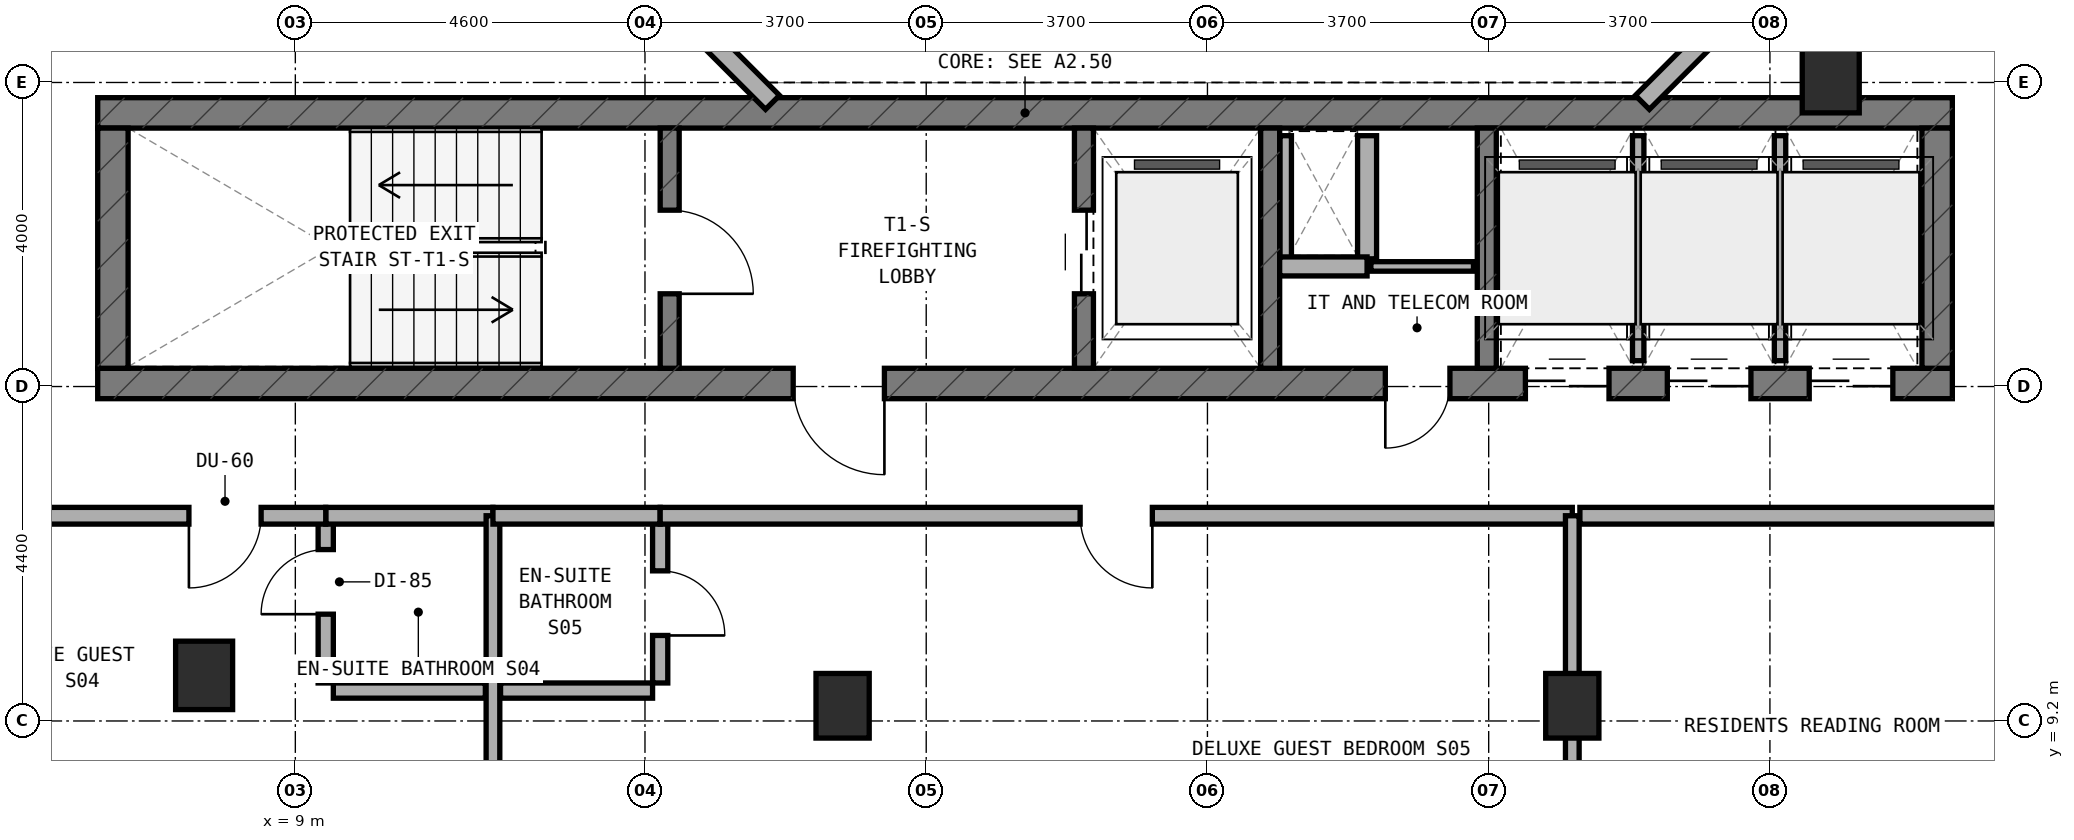
"""IFC4 building model, lengths in metres.
Left out: names, types, materials, properties, quantities, classifications, styles, units other than length and angle.
Written with IfcOpenShell. Run it as: python <this file> out.ifc"""

import sys

from ifc_helpers import new_model, si_unit, direction, frame, frame_2d, origin, origin_2d, place, context, subcontext, project, spatial, rectangle, extrude, element, fill, save


model = new_model("IFC4")
c1 = context("Model", 3, precision=1e-05, world=origin(), true_north=direction((0.0, 1.0)))
c2 = subcontext(c1, "Body", "Model", "MODEL_VIEW")
j1 = project(units=[si_unit("LENGTHUNIT", "METRE"), si_unit("PLANEANGLEUNIT", "RADIAN")], contexts=[c1])
p1 = place(None, origin())
s1 = spatial("IfcSite", under=j1, at=p1, CompositionType="ELEMENT")
p2 = place(p1, origin())
s2 = spatial("IfcBuilding", under=s1, at=p2, CompositionType="ELEMENT")
p3 = place(p2, frame((0.0, 0.0, 235.1)))
s3 = spatial("IfcBuildingStorey", under=s2, at=p3, CompositionType="ELEMENT", Elevation=235.1)
p4 = place(p3, frame((6.4, 13.64, 0.0), z_axis=(0.0, 0.0, 1.0), x_axis=(1.0, 0.0, 0.0)))
e1 = element("IfcWall", 1, at=p4, inside=s3, PredefinedType="SHEAR", context=c2, shape_type="SweptSolid", body=[
    extrude(rectangle(XDim=24.4, YDim=0.4, at=frame_2d((12.2, 0.0))), origin(), (0.0, 0.0, 1.0), 3.6),
])
p5 = place(p4, frame((9.15, 0.0, 0.0)))
e2 = element("IfcOpeningElement", 2, at=p5, cuts=e1, PredefinedType="OPENING", context=c2, shape_type="SweptSolid", body=[
    extrude(rectangle(XDim=1.2, YDim=2.15, at=frame_2d((0.6, 1.075))), frame((0.0, 0.21, 0.0), z_axis=(0.0, -1.0, 0.0), x_axis=(1.0, 0.0, 0.0)), (0.0, 0.0, 1.0), 0.42),
])
p6 = place(p4, frame((16.94, 0.0, 0.0)))
e3 = element("IfcOpeningElement", 3, at=p6, cuts=e1, PredefinedType="OPENING", context=c2, shape_type="SweptSolid", body=[
    extrude(rectangle(XDim=0.85, YDim=2.1, at=frame_2d((0.425, 1.05))), frame((0.0, 0.21, 0.0), z_axis=(0.0, -1.0, 0.0), x_axis=(1.0, 0.0, 0.0)), (0.0, 0.0, 1.0), 0.42),
])
p7 = place(p4, frame((18.783, 0.0, 0.0)))
e4 = element("IfcOpeningElement", 4, at=p7, cuts=e1, PredefinedType="OPENING", context=c2, shape_type="SweptSolid", body=[
    extrude(rectangle(XDim=1.1, YDim=2.15, at=frame_2d((0.55, 1.075))), frame((0.0, 0.21, 0.0), z_axis=(0.0, -1.0, 0.0), x_axis=(1.0, 0.0, 0.0)), (0.0, 0.0, 1.0), 0.42),
])
p8 = place(p4, frame((20.65, 0.0, 0.0)))
e5 = element("IfcOpeningElement", 5, at=p8, cuts=e1, PredefinedType="OPENING", context=c2, shape_type="SweptSolid", body=[
    extrude(rectangle(XDim=1.1, YDim=2.15, at=frame_2d((0.55, 1.075))), frame((0.0, 0.21, 0.0), z_axis=(0.0, -1.0, 0.0), x_axis=(1.0, 0.0, 0.0)), (0.0, 0.0, 1.0), 0.42),
])
p9 = place(p4, frame((22.517, 0.0, 0.0)))
e6 = element("IfcOpeningElement", 6, at=p9, cuts=e1, PredefinedType="OPENING", context=c2, shape_type="SweptSolid", body=[
    extrude(rectangle(XDim=1.1, YDim=2.15, at=frame_2d((0.55, 1.075))), frame((0.0, 0.21, 0.0), z_axis=(0.0, -1.0, 0.0), x_axis=(1.0, 0.0, 0.0)), (0.0, 0.0, 1.0), 0.42),
])
p10 = place(p3, frame((6.4, 17.2, 0.0), z_axis=(0.0, 0.0, 1.0), x_axis=(1.0, 0.0, 0.0)))
e7 = element("IfcWall", 7, at=p10, inside=s3, PredefinedType="SHEAR", context=c2, shape_type="SweptSolid", body=[
    extrude(rectangle(XDim=24.4, YDim=0.4, at=frame_2d((12.2, 0.0))), origin(), (0.0, 0.0, 1.0), 3.6),
])
for number, where, z_axis, x_axis in (
    (8, (6.6, 13.84, 0.0), (0.0, 0.0, 1.0), (0.0, 1.0, 0.0)),
    (9, (30.6, 13.84, 0.0), (0.0, 0.0, 1.0), (0.0, 1.0, 0.0)),
):
    element("IfcWall", number, at=place(p3, frame(where, z_axis=z_axis, x_axis=x_axis)), inside=s3, PredefinedType="SHEAR", context=c2, shape_type="SweptSolid", body=[
        extrude(rectangle(XDim=3.16, YDim=0.4, at=frame_2d((1.58, 0.0))), origin(), (0.0, 0.0, 1.0), 3.6),
    ])
p11 = place(p3, frame((13.925, 13.84, 0.0), z_axis=(0.0, 0.0, 1.0), x_axis=(0.0, 1.0, 0.0)))
e10 = element("IfcWall", 10, at=p11, inside=s3, PredefinedType="STANDARD", context=c2, shape_type="SweptSolid", body=[
    extrude(rectangle(XDim=3.16, YDim=0.25, at=frame_2d((1.58, 0.0))), origin(), (0.0, 0.0, 1.0), 3.28),
])
p12 = place(p11, frame((0.98, 0.0, 0.0)))
e11 = element("IfcOpeningElement", 11, at=p12, cuts=e10, PredefinedType="OPENING", context=c2, shape_type="SweptSolid", body=[
    extrude(rectangle(XDim=1.1, YDim=2.15, at=frame_2d((0.55, 1.075))), frame((0.0, 0.135, 0.0), z_axis=(0.0, -1.0, 0.0), x_axis=(1.0, 0.0, 0.0)), (0.0, 0.0, 1.0), 0.27),
])
p13 = place(p3, frame((19.375, 13.84, 0.0), z_axis=(0.0, 0.0, 1.0), x_axis=(0.0, 1.0, 0.0)))
e12 = element("IfcWall", 12, at=p13, inside=s3, PredefinedType="STANDARD", context=c2, shape_type="SweptSolid", body=[
    extrude(rectangle(XDim=3.16, YDim=0.25, at=frame_2d((1.58, 0.0))), origin(), (0.0, 0.0, 1.0), 3.28),
])
p14 = place(p13, frame((0.98, 0.0, 0.0)))
e13 = element("IfcOpeningElement", 13, at=p14, cuts=e12, PredefinedType="OPENING", context=c2, shape_type="SweptSolid", body=[
    extrude(rectangle(XDim=1.1, YDim=2.15, at=frame_2d((0.55, 1.075))), frame((0.0, 0.135, 0.0), z_axis=(0.0, -1.0, 0.0), x_axis=(1.0, 0.0, 0.0)), (0.0, 0.0, 1.0), 0.27),
])
for number, where, z_axis, x_axis in (
    (14, (21.825, 13.84, 0.0), (0.0, 0.0, 1.0), (0.0, 1.0, 0.0)),
    (15, (24.675, 13.84, 0.0), (0.0, 0.0, 1.0), (0.0, 1.0, 0.0)),
):
    element("IfcWall", number, at=place(p3, frame(where, z_axis=z_axis, x_axis=x_axis)), inside=s3, PredefinedType="STANDARD", context=c2, shape_type="SweptSolid", body=[
        extrude(rectangle(XDim=3.16, YDim=0.25, at=frame_2d((1.58, 0.0))), origin(), (0.0, 0.0, 1.0), 3.28),
    ])
for number, where, z_axis, x_axis in (
    (16, (16.2, 9.4, 0.0), (0.0, 0.0, 1.0), (1.0, 0.0, 0.0)),
    (17, (25.8, 9.4, 0.0), (0.0, 0.0, 1.0), (1.0, 0.0, 0.0)),
):
    element("IfcColumn", number, at=place(p3, frame(where, z_axis=z_axis, x_axis=x_axis)), inside=s3, PredefinedType="COLUMN", context=c2, shape_type="SweptSolid", body=[
        extrude(rectangle(XDim=0.7, YDim=0.85, at=origin_2d()), origin(), (0.0, 0.0, 1.0), 3.6),
    ])
for number, where, z_axis, x_axis in (
    (18, (7.8, 9.8, 0.0), (0.0, 0.0, 1.0), (1.0, 0.0, 0.0)),
    (19, (29.2, 17.65, 0.0), (0.0, 0.0, 1.0), (1.0, 0.0, 0.0)),
):
    element("IfcColumn", number, at=place(p3, frame(where, z_axis=z_axis, x_axis=x_axis)), inside=s3, PredefinedType="COLUMN", context=c2, shape_type="SweptSolid", body=[
        extrude(rectangle(XDim=0.75, YDim=0.9, at=origin_2d()), origin(), (0.0, 0.0, 1.0), 3.6),
    ])
for number, where, z_axis, x_axis in (
    (20, (26.722, 17.338, 0.0), (0.0, 0.0, 1.0), (0.707, 0.707, 0.0)),
    (21, (13.444, 19.172, 0.0), (0.0, 0.0, 1.0), (0.707, -0.707, 0.0)),
):
    element("IfcWall", number, at=place(p3, frame(where, z_axis=z_axis, x_axis=x_axis)), inside=s3, PredefinedType="STANDARD", context=c2, shape_type="SweptSolid", body=[
        extrude(rectangle(XDim=2.594, YDim=0.26, at=frame_2d((1.297, 0.0))), origin(), (0.0, 0.0, 1.0), 3.28),
    ])
p15 = place(p3, frame((22.03, 15.28, 0.0), z_axis=(0.0, 0.0, 1.0), x_axis=(0.0, 1.0, 0.0)))
e22 = element("IfcWall", 22, at=p15, inside=s3, PredefinedType="PARTITIONING", context=c2, shape_type="SweptSolid", body=[
    extrude(rectangle(XDim=1.62, YDim=0.15, at=frame_2d((0.81, 0.0))), origin(), (0.0, 0.0, 1.0), 3.28),
])
p16 = place(p3, frame((23.1, 15.28, 0.0), z_axis=(0.0, 0.0, 1.0), x_axis=(0.0, 1.0, 0.0)))
e23 = element("IfcWall", 23, at=p16, inside=s3, PredefinedType="SOLIDWALL", context=c2, shape_type="SweptSolid", body=[
    extrude(rectangle(XDim=1.62, YDim=0.25, at=frame_2d((0.81, 0.0))), origin(), (0.0, 0.0, 1.0), 3.28),
])
p17 = place(p3, frame((21.95, 15.18, 0.0), z_axis=(0.0, 0.0, 1.0), x_axis=(1.0, 0.0, 0.0)))
e24 = element("IfcWall", 24, at=p17, inside=s3, PredefinedType="SOLIDWALL", context=c2, shape_type="SweptSolid", body=[
    extrude(rectangle(XDim=1.15, YDim=0.25, at=frame_2d((0.575, 0.0))), origin(), (0.0, 0.0, 1.0), 3.28),
])
p18 = place(p3, frame((23.15, 15.18, 0.0), z_axis=(0.0, 0.0, 1.0), x_axis=(1.0, 0.0, 0.0)))
e25 = element("IfcWall", 25, at=p18, inside=s3, PredefinedType="PARTITIONING", context=c2, shape_type="SweptSolid", body=[
    extrude(rectangle(XDim=1.35, YDim=0.125, at=frame_2d((0.675, 0.0))), origin(), (0.0, 0.0, 1.0), 3.28),
])
p19 = place(p3, frame((26.667, 13.94, 0.0), z_axis=(0.0, 0.0, 1.0), x_axis=(0.0, 1.0, 0.0)))
e26 = element("IfcWall", 26, at=p19, inside=s3, PredefinedType="PARTITIONING", context=c2, shape_type="SweptSolid", body=[
    extrude(rectangle(XDim=2.96, YDim=0.15, at=frame_2d((1.48, 0.0))), origin(), (0.0, 0.0, 1.0), 3.28),
])
p20 = place(p3, frame((28.533, 13.94, 0.0), z_axis=(0.0, 0.0, 1.0), x_axis=(0.0, 1.0, 0.0)))
e27 = element("IfcWall", 27, at=p20, inside=s3, PredefinedType="PARTITIONING", context=c2, shape_type="SweptSolid", body=[
    extrude(rectangle(XDim=2.96, YDim=0.15, at=frame_2d((1.48, 0.0))), origin(), (0.0, 0.0, 1.0), 2.705),
])
p21 = place(p3, frame((9.4, 9.7, 0.0), z_axis=(0.0, 0.0, 1.0), x_axis=(0.0, 1.0, 0.0)))
e28 = element("IfcWall", 28, at=p21, inside=s3, PredefinedType="PLUMBINGWALL", context=c2, shape_type="SweptSolid", body=[
    extrude(rectangle(XDim=2.1, YDim=0.2, at=frame_2d((1.05, 0.0))), origin(), (0.0, 0.0, 1.0), 2.895),
])
p22 = place(p21, frame((0.905, 0.0, 0.0)))
e29 = element("IfcOpeningElement", 29, at=p22, cuts=e28, PredefinedType="OPENING", context=c2, shape_type="SweptSolid", body=[
    extrude(rectangle(XDim=0.85, YDim=2.1, at=frame_2d((0.425, 1.05))), frame((0.0, 0.11, 0.0), z_axis=(0.0, -1.0, 0.0), x_axis=(1.0, 0.0, 0.0)), (0.0, 0.0, 1.0), 0.22),
])
p23 = place(p3, frame((9.5, 9.6, 0.0), z_axis=(0.0, 0.0, 1.0), x_axis=(1.0, 0.0, 0.0)))
e30 = element("IfcWall", 30, at=p23, inside=s3, PredefinedType="PLUMBINGWALL", context=c2, shape_type="SweptSolid", body=[
    extrude(rectangle(XDim=2.0, YDim=0.2, at=frame_2d((1.0, 0.0))), origin(), (0.0, 0.0, 1.0), 2.975),
])
p24 = place(p3, frame((9.4, 11.9, 0.0), z_axis=(0.0, 0.0, 1.0), x_axis=(1.0, 0.0, 0.0)))
e31 = element("IfcWall", 31, at=p24, inside=s3, PredefinedType="SOLIDWALL", context=c2, shape_type="SweptSolid", body=[
    extrude(rectangle(XDim=2.2, YDim=0.22, at=frame_2d((1.1, 0.0))), origin(), (0.0, 0.0, 1.0), 3.28),
])
p25 = place(p3, frame((1.96, 11.9, 0.0), z_axis=(0.0, 0.0, 1.0), x_axis=(1.0, 0.0, 0.0)))
e32 = element("IfcWall", 32, at=p25, inside=s3, PredefinedType="SOLIDWALL", context=c2, shape_type="SweptSolid", body=[
    extrude(rectangle(XDim=7.44, YDim=0.22, at=frame_2d((3.72, 0.0))), origin(), (0.0, 0.0, 1.0), 2.705),
])
p26 = place(p25, frame((5.64, 0.0, 0.0)))
e33 = element("IfcOpeningElement", 33, at=p26, cuts=e32, PredefinedType="OPENING", context=c2, shape_type="SweptSolid", body=[
    extrude(rectangle(XDim=0.95, YDim=2.1, at=frame_2d((0.475, 1.05))), frame((0.0, 0.12, 0.0), z_axis=(0.0, -1.0, 0.0), x_axis=(1.0, 0.0, 0.0)), (0.0, 0.0, 1.0), 0.24),
])
p27 = place(p3, frame((11.6, 6.586, 0.0), z_axis=(0.0, 0.0, 1.0), x_axis=(0.0, 1.0, 0.0)))
e34 = element("IfcWall", 34, at=p27, inside=s3, PredefinedType="SOLIDWALL", context=c2, shape_type="SweptSolid", body=[
    extrude(rectangle(XDim=5.314, YDim=0.18, at=frame_2d((2.657, 0.0))), origin(), (0.0, 0.0, 1.0), 2.895),
])
p28 = place(p3, frame((13.8, 9.7, 0.0), z_axis=(0.0, 0.0, 1.0), x_axis=(0.0, 1.0, 0.0)))
e35 = element("IfcWall", 35, at=p28, inside=s3, PredefinedType="PLUMBINGWALL", context=c2, shape_type="SweptSolid", body=[
    extrude(rectangle(XDim=2.1, YDim=0.2, at=frame_2d((1.05, 0.0))), origin(), (0.0, 0.0, 1.0), 2.895),
])
p29 = place(p28, frame((0.625, 0.0, 0.0)))
e36 = element("IfcOpeningElement", 36, at=p29, cuts=e35, PredefinedType="OPENING", context=c2, shape_type="SweptSolid", body=[
    extrude(rectangle(XDim=0.85, YDim=2.1, at=frame_2d((0.425, 1.05))), frame((0.0, 0.11, 0.0), z_axis=(0.0, -1.0, 0.0), x_axis=(1.0, 0.0, 0.0)), (0.0, 0.0, 1.0), 0.22),
])
p30 = place(p3, frame((11.7, 9.6, 0.0), z_axis=(0.0, 0.0, 1.0), x_axis=(1.0, 0.0, 0.0)))
e37 = element("IfcWall", 37, at=p30, inside=s3, PredefinedType="PLUMBINGWALL", context=c2, shape_type="SweptSolid", body=[
    extrude(rectangle(XDim=2.0, YDim=0.2, at=frame_2d((1.0, 0.0))), origin(), (0.0, 0.0, 1.0), 2.975),
])
p31 = place(p3, frame((11.6, 11.9, 0.0), z_axis=(0.0, 0.0, 1.0), x_axis=(1.0, 0.0, 0.0)))
e38 = element("IfcWall", 38, at=p31, inside=s3, PredefinedType="SOLIDWALL", context=c2, shape_type="SweptSolid", body=[
    extrude(rectangle(XDim=2.2, YDim=0.22, at=frame_2d((1.1, 0.0))), origin(), (0.0, 0.0, 1.0), 3.28),
])
p32 = place(p3, frame((13.8, 11.9, 0.0), z_axis=(0.0, 0.0, 1.0), x_axis=(1.0, 0.0, 0.0)))
e39 = element("IfcWall", 39, at=p32, inside=s3, PredefinedType="SOLIDWALL", context=c2, shape_type="SweptSolid", body=[
    extrude(rectangle(XDim=12.0, YDim=0.22, at=frame_2d((6.0, 0.0))), origin(), (0.0, 0.0, 1.0), 2.705),
])
p33 = place(p32, frame((5.525, 0.0, 0.0)))
e40 = element("IfcOpeningElement", 40, at=p33, cuts=e39, PredefinedType="OPENING", context=c2, shape_type="SweptSolid", body=[
    extrude(rectangle(XDim=0.95, YDim=2.1, at=frame_2d((0.475, 1.05))), frame((0.0, 0.12, 0.0), z_axis=(0.0, -1.0, 0.0), x_axis=(1.0, 0.0, 0.0)), (0.0, 0.0, 1.0), 0.24),
])
p34 = place(p3, frame((25.8, 5.86, 0.0), z_axis=(0.0, 0.0, 1.0), x_axis=(0.0, 1.0, 0.0)))
e41 = element("IfcWall", 41, at=p34, inside=s3, PredefinedType="SOLIDWALL", context=c2, shape_type="SweptSolid", body=[
    extrude(rectangle(XDim=6.04, YDim=0.18, at=frame_2d((3.02, 0.0))), origin(), (0.0, 0.0, 1.0), 2.705),
])
p35 = place(p3, frame((25.9, 11.9, 0.0), z_axis=(0.0, 0.0, 1.0), x_axis=(1.0, 0.0, 0.0)))
e42 = element("IfcWall", 42, at=p35, inside=s3, PredefinedType="SOLIDWALL", context=c2, shape_type="SweptSolid", body=[
    extrude(rectangle(XDim=14.04, YDim=0.22, at=frame_2d((7.02, 0.0))), origin(), (0.0, 0.0, 1.0), 2.705),
])
p36 = place(p35, frame((5.881, 0.0, 0.0)))
e43 = element("IfcOpeningElement", 43, at=p36, cuts=e42, PredefinedType="OPENING", context=c2, shape_type="SweptSolid", body=[
    extrude(rectangle(XDim=0.95, YDim=2.1, at=frame_2d((0.475, 1.05))), frame((0.0, 0.12, 0.0), z_axis=(0.0, -1.0, 0.0), x_axis=(1.0, 0.0, 0.0)), (0.0, 0.0, 1.0), 0.24),
])
p37 = place(p12, frame((1.1, 0.0, 0.0), z_axis=(0.0, 0.0, 1.0), x_axis=(-1.0, 0.0, 0.0)))
e44 = element("IfcDoor", 44, at=p37, inside=s3, OperationType="SINGLE_SWING_RIGHT", PredefinedType="DOOR", context=c2, shape_type="SweptSolid", body=[
    extrude(rectangle(XDim=1.1, YDim=2.15, at=frame_2d((0.55, 1.075))), frame((0.0, 0.025, 0.0), z_axis=(0.0, -1.0, 0.0), x_axis=(1.0, 0.0, 0.0)), (0.0, 0.0, 1.0), 0.05),
])
fill(e11, e44)
p38 = place(p5, frame((1.2, 0.0, 0.0), z_axis=(0.0, 0.0, 1.0), x_axis=(-1.0, 0.0, 0.0)))
e45 = element("IfcDoor", 45, at=p38, inside=s3, OperationType="SINGLE_SWING_LEFT", PredefinedType="DOOR", context=c2, shape_type="SweptSolid", body=[
    extrude(rectangle(XDim=1.2, YDim=2.15, at=frame_2d((0.6, 1.075))), frame((0.0, 0.025, 0.0), z_axis=(0.0, -1.0, 0.0), x_axis=(1.0, 0.0, 0.0)), (0.0, 0.0, 1.0), 0.05),
])
fill(e2, e45)
p39 = place(p14, origin())
e46 = element("IfcDoor", 46, at=p39, inside=s3, OperationType="DOUBLE_DOOR_SLIDING", PredefinedType="DOOR", context=c2, shape_type="SweptSolid", body=[
    extrude(rectangle(XDim=1.1, YDim=2.15, at=frame_2d((0.55, 1.075))), frame((0.0, 0.025, 0.0), z_axis=(0.0, -1.0, 0.0), x_axis=(1.0, 0.0, 0.0)), (0.0, 0.0, 1.0), 0.05),
])
fill(e13, e46)
p40 = place(p6, frame((0.85, 0.0, 0.0), z_axis=(0.0, 0.0, 1.0), x_axis=(-1.0, 0.0, 0.0)))
e47 = element("IfcDoor", 47, at=p40, inside=s3, OperationType="SINGLE_SWING_RIGHT", PredefinedType="DOOR", context=c2, shape_type="SweptSolid", body=[
    extrude(rectangle(XDim=0.85, YDim=2.1, at=frame_2d((0.425, 1.05))), frame((0.0, 0.025, 0.0), z_axis=(0.0, -1.0, 0.0), x_axis=(1.0, 0.0, 0.0)), (0.0, 0.0, 1.0), 0.05),
])
fill(e3, e47)
p41 = place(p7, frame((1.1, 0.0, 0.0), z_axis=(0.0, 0.0, 1.0), x_axis=(-1.0, 0.0, 0.0)))
e48 = element("IfcDoor", 48, at=p41, inside=s3, OperationType="DOUBLE_DOOR_SLIDING", PredefinedType="DOOR", context=c2, shape_type="SweptSolid", body=[
    extrude(rectangle(XDim=1.1, YDim=2.15, at=frame_2d((0.55, 1.075))), frame((0.0, 0.025, 0.0), z_axis=(0.0, -1.0, 0.0), x_axis=(1.0, 0.0, 0.0)), (0.0, 0.0, 1.0), 0.05),
])
fill(e4, e48)
p42 = place(p8, frame((1.1, 0.0, 0.0), z_axis=(0.0, 0.0, 1.0), x_axis=(-1.0, 0.0, 0.0)))
e49 = element("IfcDoor", 49, at=p42, inside=s3, OperationType="DOUBLE_DOOR_SLIDING", PredefinedType="DOOR", context=c2, shape_type="SweptSolid", body=[
    extrude(rectangle(XDim=1.1, YDim=2.15, at=frame_2d((0.55, 1.075))), frame((0.0, 0.025, 0.0), z_axis=(0.0, -1.0, 0.0), x_axis=(1.0, 0.0, 0.0)), (0.0, 0.0, 1.0), 0.05),
])
fill(e5, e49)
p43 = place(p9, frame((1.1, 0.0, 0.0), z_axis=(0.0, 0.0, 1.0), x_axis=(-1.0, 0.0, 0.0)))
e50 = element("IfcDoor", 50, at=p43, inside=s3, OperationType="DOUBLE_DOOR_SLIDING", PredefinedType="DOOR", context=c2, shape_type="SweptSolid", body=[
    extrude(rectangle(XDim=1.1, YDim=2.15, at=frame_2d((0.55, 1.075))), frame((0.0, 0.025, 0.0), z_axis=(0.0, -1.0, 0.0), x_axis=(1.0, 0.0, 0.0)), (0.0, 0.0, 1.0), 0.05),
])
fill(e6, e50)
p44 = place(p22, origin())
e51 = element("IfcDoor", 51, at=p44, inside=s3, OperationType="SINGLE_SWING_LEFT", PredefinedType="DOOR", context=c2, shape_type="SweptSolid", body=[
    extrude(rectangle(XDim=0.85, YDim=2.1, at=frame_2d((0.425, 1.05))), frame((0.0, 0.025, 0.0), z_axis=(0.0, -1.0, 0.0), x_axis=(1.0, 0.0, 0.0)), (0.0, 0.0, 1.0), 0.05),
])
fill(e29, e51)
p45 = place(p26, frame((0.95, 0.0, 0.0), z_axis=(0.0, 0.0, 1.0), x_axis=(-1.0, 0.0, 0.0)))
e52 = element("IfcDoor", 52, at=p45, inside=s3, OperationType="SINGLE_SWING_RIGHT", PredefinedType="DOOR", context=c2, shape_type="SweptSolid", body=[
    extrude(rectangle(XDim=0.95, YDim=2.1, at=frame_2d((0.475, 1.05))), frame((0.0, 0.025, 0.0), z_axis=(0.0, -1.0, 0.0), x_axis=(1.0, 0.0, 0.0)), (0.0, 0.0, 1.0), 0.05),
])
fill(e33, e52)
p46 = place(p29, frame((0.85, 0.0, 0.0), z_axis=(0.0, 0.0, 1.0), x_axis=(-1.0, 0.0, 0.0)))
e53 = element("IfcDoor", 53, at=p46, inside=s3, OperationType="SINGLE_SWING_RIGHT", PredefinedType="DOOR", context=c2, shape_type="SweptSolid", body=[
    extrude(rectangle(XDim=0.85, YDim=2.1, at=frame_2d((0.425, 1.05))), frame((0.0, 0.025, 0.0), z_axis=(0.0, -1.0, 0.0), x_axis=(1.0, 0.0, 0.0)), (0.0, 0.0, 1.0), 0.05),
])
fill(e36, e53)
p47 = place(p33, frame((0.95, 0.0, 0.0), z_axis=(0.0, 0.0, 1.0), x_axis=(-1.0, 0.0, 0.0)))
e54 = element("IfcDoor", 54, at=p47, inside=s3, OperationType="SINGLE_SWING_LEFT", PredefinedType="DOOR", context=c2, shape_type="SweptSolid", body=[
    extrude(rectangle(XDim=0.95, YDim=2.1, at=frame_2d((0.475, 1.05))), frame((0.0, 0.025, 0.0), z_axis=(0.0, -1.0, 0.0), x_axis=(1.0, 0.0, 0.0)), (0.0, 0.0, 1.0), 0.05),
])
fill(e40, e54)
save(model, sys.argv[1])
